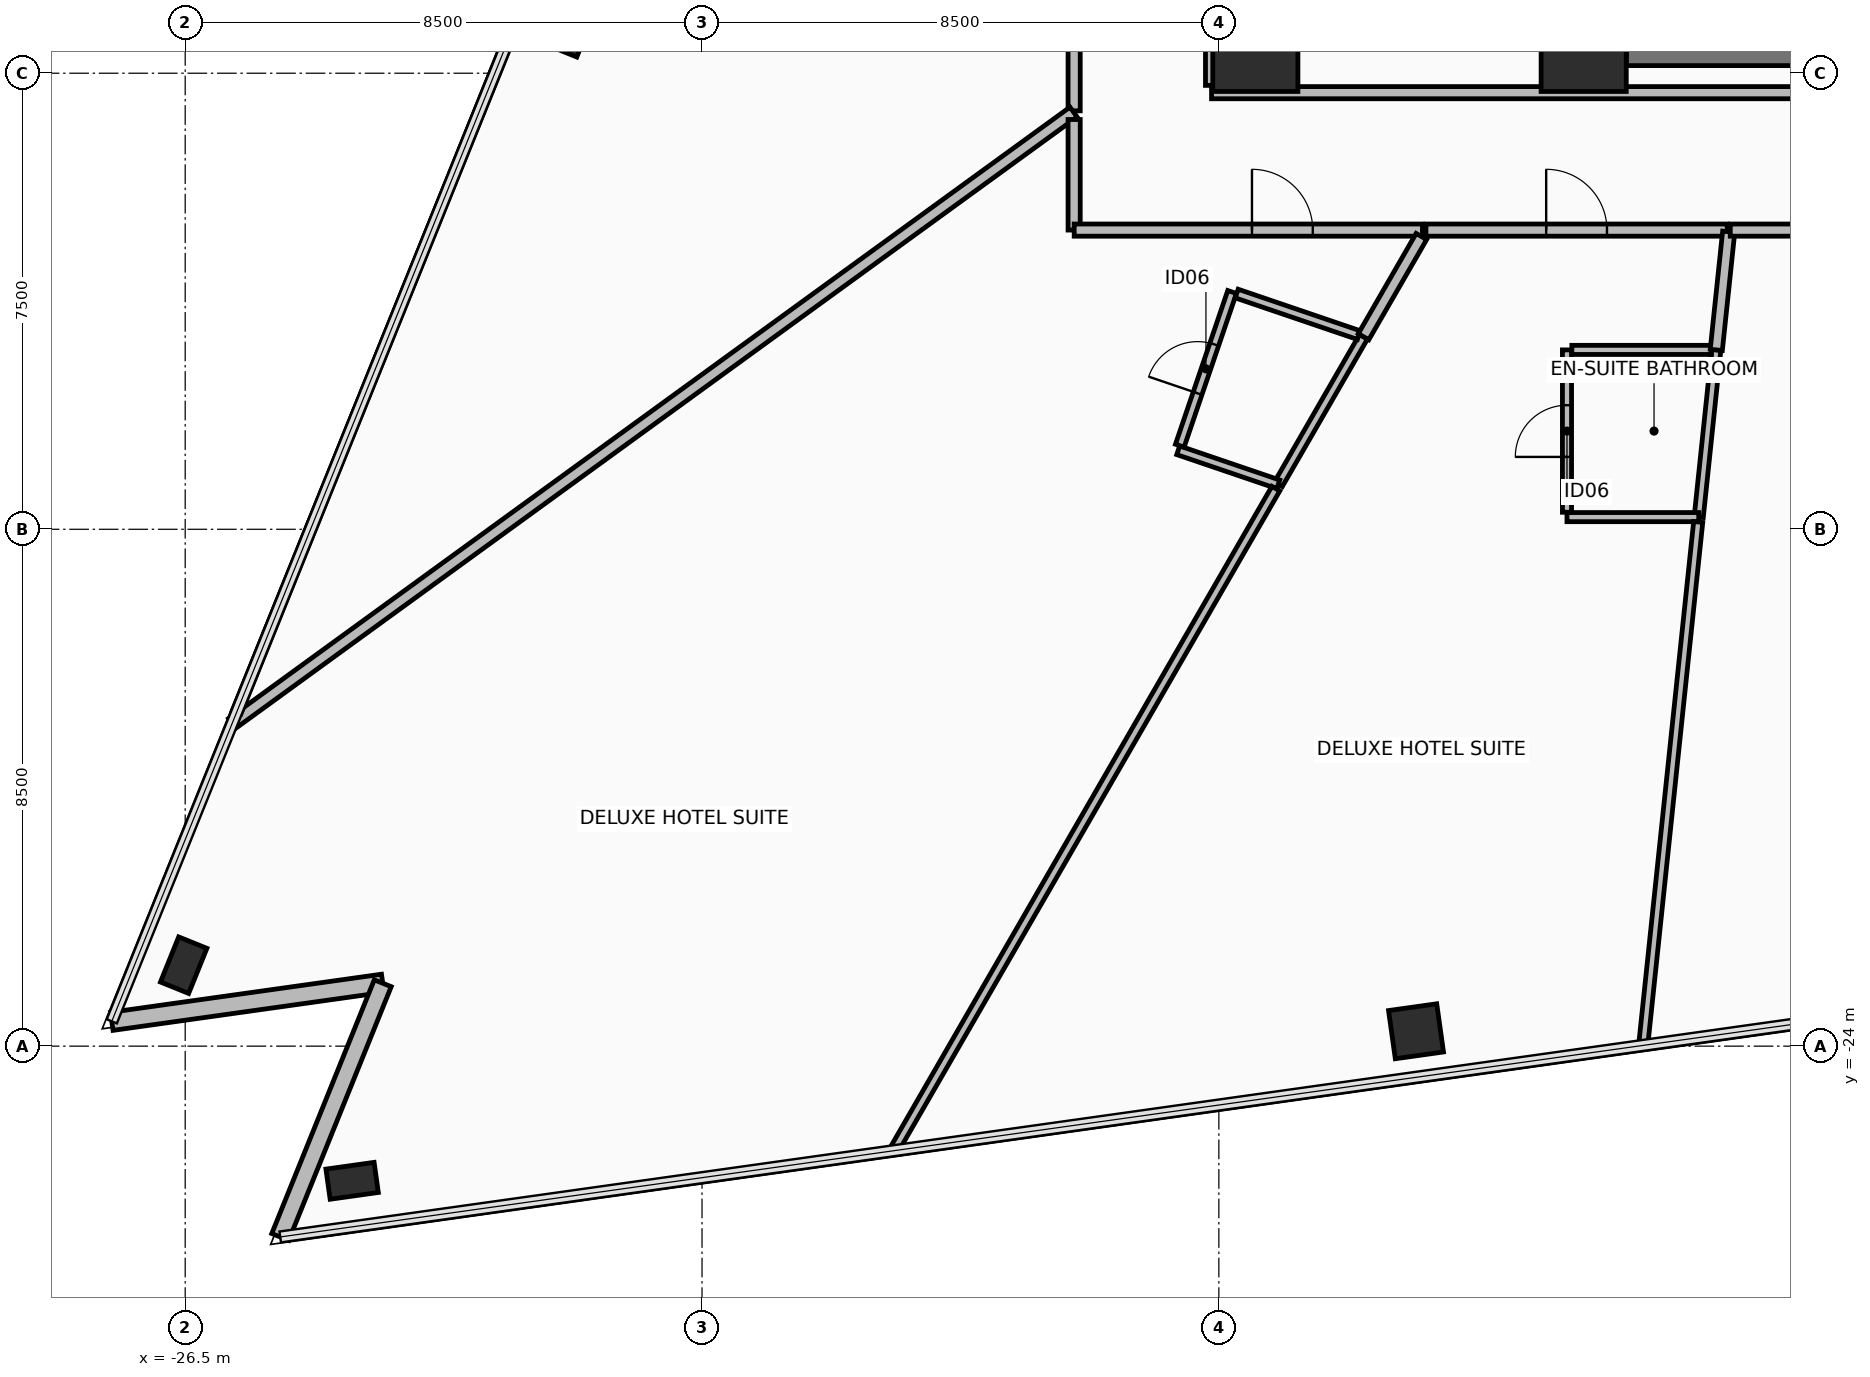
"""IFC4 building model, lengths in metres.
Left out: names, types, materials, properties, quantities, classifications, styles, units other than length and angle.
Written with IfcOpenShell. Run it as: python <this file> out.ifc"""

import sys

from ifc_helpers import new_model, si_unit, direction, frame, frame_2d, origin, origin_2d, place, context, subcontext, project, spatial, rectangle, hollow_rectangle, extrude, element, fill, save


model = new_model("IFC4")
c1 = context("Model", 3, precision=1e-05, world=origin(), true_north=direction((0.0, 1.0)))
c2 = subcontext(c1, "Body", "Model", "MODEL_VIEW")
j1 = project(units=[si_unit("LENGTHUNIT", "METRE"), si_unit("PLANEANGLEUNIT", "RADIAN")], contexts=[c1])
p1 = place(None, origin())
s1 = spatial("IfcSite", under=j1, at=p1, CompositionType="ELEMENT")
p2 = place(p1, origin())
s2 = spatial("IfcBuilding", under=s1, at=p2, CompositionType="ELEMENT")
p3 = place(p2, frame((0.0, 0.0, 63.85)))
s3 = spatial("IfcBuildingStorey", under=s2, at=p3, CompositionType="ELEMENT", Elevation=63.85)
for number, where, z_axis, x_axis in (
    (1, (-8.9, -7.6, 0.0), (0.0, 0.0, 1.0), (1.0, 0.0, 0.0)),
    (2, (-3.5, -7.6, 0.0), (0.0, 0.0, 1.0), (1.0, 0.0, 0.0)),
):
    element("IfcColumn", number, at=place(p3, frame(where, z_axis=z_axis, x_axis=x_axis)), inside=s3, PredefinedType="COLUMN", context=c2, shape_type="SweptSolid", body=[
        extrude(rectangle(XDim=1.4, YDim=1.4, at=origin_2d()), origin(), (0.0, 0.0, 1.0), 3.45),
    ])
p4 = place(p3, frame((-20.281, -7.213, 0.0), z_axis=(0.0, 0.0, 1.0), x_axis=(0.374608211656, 0.927183200754, 0.0)))
e3 = element("IfcColumn", 3, at=p4, inside=s3, PredefinedType="COLUMN", context=c2, shape_type="SweptSolid", body=[
    extrude(hollow_rectangle(XDim=0.8, YDim=0.8, WallThickness=0.045, at=origin_2d()), origin(), (0.0, 0.0, 1.0), 3.45),
])
for number, where, z_axis, x_axis in (
    (4, (-26.525, -22.668, 0.0), (0.0, 0.0, 1.0), (0.375, 0.927, 0.0)),
    (5, (-23.755, -26.214, 0.0), (0.0, 0.0, 1.0), (0.99, 0.139, 0.0)),
):
    element("IfcColumn", number, at=place(p3, frame(where, z_axis=z_axis, x_axis=x_axis)), inside=s3, PredefinedType="COLUMN", context=c2, shape_type="SweptSolid", body=[
        extrude(hollow_rectangle(XDim=0.5, YDim=0.8, WallThickness=0.04, at=origin_2d()), origin(), (0.0, 0.0, 1.0), 3.45),
    ])
p5 = place(p3, frame((-6.257, -23.755, 0.0), z_axis=(0.0, 0.0, 1.0), x_axis=(0.990268068742, 0.13917310096, 0.0)))
e6 = element("IfcColumn", 6, at=p5, inside=s3, PredefinedType="COLUMN", context=c2, shape_type="SweptSolid", body=[
    extrude(hollow_rectangle(XDim=0.8, YDim=0.8, WallThickness=0.045, at=origin_2d()), origin(), (0.0, 0.0, 1.0), 3.45),
])
p6 = place(p3, frame((-27.707, -23.592, 0.0), z_axis=(0.0, 0.0, 1.0), x_axis=(0.990269200152, 0.139165050317, 0.0)))
e7 = element("IfcWall", 7, at=p6, inside=s3, PredefinedType="STANDARD", context=c2, shape_type="SweptSolid", body=[
    extrude(rectangle(XDim=4.5, YDim=0.3, at=frame_2d((2.25, 0.0))), origin(), (0.0, 0.0, 1.0), 2.47),
])
p7 = place(p3, frame((-23.251, -22.966, 0.0), z_axis=(0.0, 0.0, 1.0), x_axis=(-0.374568898324, -0.927199083481, 0.0)))
e8 = element("IfcWall", 8, at=p7, inside=s3, PredefinedType="STANDARD", context=c2, shape_type="SweptSolid", body=[
    extrude(rectangle(XDim=4.5, YDim=0.3, at=frame_2d((2.25, 0.0))), origin(), (0.0, 0.0, 1.0), 2.47),
])
p8 = place(p3, frame((-2.8, -7.6, 0.0), z_axis=(0.0, 0.0, 1.0), x_axis=(1.0, 0.0, 0.0)))
e9 = element("IfcWall", 9, at=p8, inside=s3, PredefinedType="SHEAR", context=c2, shape_type="SweptSolid", body=[
    extrude(rectangle(XDim=5.38, YDim=0.55, at=frame_2d((2.69, 0.0))), origin(), (0.0, 0.0, 1.0), 3.275),
])
p9 = place(p3, frame((-9.62, -8.32, 0.0), z_axis=(0.0, 0.0, 1.0), x_axis=(1.0, 0.0, 0.0)))
e10 = element("IfcWall", 10, at=p9, inside=s3, PredefinedType="PARTITIONING", context=c2, shape_type="SweptSolid", body=[
    extrude(rectangle(XDim=19.24, YDim=0.2, at=frame_2d((9.62, 0.0))), origin(), (0.0, 0.0, 1.0), 2.67),
])
p10 = place(p9, frame((15.02, 0.0, 0.0)))
e11 = element("IfcOpeningElement", 11, at=p10, cuts=e10, PredefinedType="OPENING", context=c2, shape_type="SweptSolid", body=[
    extrude(rectangle(XDim=0.9, YDim=2.1, at=frame_2d((0.45, 1.05))), frame((0.0, 0.11, 0.0), z_axis=(0.0, -1.0, 0.0), x_axis=(1.0, 0.0, 0.0)), (0.0, 0.0, 1.0), 0.22),
])
p11 = place(p3, frame((-9.62, 8.2, 0.0), z_axis=(0.0, 0.0, 1.0), x_axis=(0.0, -1.0, 0.0)))
e12 = element("IfcWall", 12, at=p11, inside=s3, PredefinedType="PARTITIONING", context=c2, shape_type="SweptSolid", body=[
    extrude(rectangle(XDim=16.4, YDim=0.2, at=frame_2d((8.2, 0.0))), origin(), (0.0, 0.0, 1.0), 2.67),
])
p12 = place(p11, frame((12.65, 0.0, 0.0)))
e13 = element("IfcOpeningElement", 13, at=p12, cuts=e12, PredefinedType="OPENING", context=c2, shape_type="SweptSolid", body=[
    extrude(rectangle(XDim=1.1, YDim=2.15, at=frame_2d((0.55, 1.075))), frame((0.0, 0.11, 0.0), z_axis=(0.0, -1.0, 0.0), x_axis=(1.0, 0.0, 0.0)), (0.0, 0.0, 1.0), 0.22),
])
p13 = place(p3, frame((-3.5, -7.6, 0.0), z_axis=(0.0, 0.0, 1.0), x_axis=(1.0, 0.0, 0.0)))
e14 = element("IfcWall", 14, at=p13, inside=s3, PredefinedType="PARTITIONING", context=c2, shape_type="SweptSolid", body=[
    extrude(rectangle(XDim=0.7, YDim=0.2, at=frame_2d((0.35, 0.0))), origin(), (0.0, 0.0, 1.0), 2.47),
])
p14 = place(p3, frame((-7.121, -12.333, 0.0), z_axis=(0.0, 0.0, 1.0), x_axis=(-0.499988825533, -0.86603185527, 0.0)))
e15 = element("IfcWall", 15, at=p14, inside=s3, PredefinedType="PARTITIONING", context=c2, shape_type="SweptSolid", body=[
    extrude(rectangle(XDim=2.803, YDim=0.15, at=frame_2d((1.402, 0.0))), origin(), (0.0, 0.0, 1.0), 2.67),
])
p15 = place(p3, frame((-8.522, -14.761, 0.0), z_axis=(0.0, 0.0, 1.0), x_axis=(-0.946713679558, 0.322076402329, 0.0)))
e16 = element("IfcWall", 16, at=p15, inside=s3, PredefinedType="PARTITIONING", context=c2, shape_type="SweptSolid", body=[
    extrude(rectangle(XDim=1.739, YDim=0.15, at=frame_2d((0.87, 0.0))), origin(), (0.0, 0.0, 1.0), 3.275),
])
p16 = place(p3, frame((-10.143, -14.125, 0.0), z_axis=(0.0, 0.0, 1.0), x_axis=(0.322146980742, 0.946689665518, 0.0)))
e17 = element("IfcWall", 17, at=p16, inside=s3, PredefinedType="PARTITIONING", context=c2, shape_type="SweptSolid", body=[
    extrude(rectangle(XDim=2.67, YDim=0.15, at=frame_2d((1.335, 0.0))), origin(), (0.0, 0.0, 1.0), 3.275),
])
p17 = place(p16, frame((0.91, 0.0, 0.0)))
e18 = element("IfcOpeningElement", 18, at=p17, cuts=e17, PredefinedType="OPENING", context=c2, shape_type="SweptSolid", body=[
    extrude(rectangle(XDim=0.85, YDim=2.1, at=frame_2d((0.425, 1.05))), frame((0.0, 0.085, 0.0), z_axis=(0.0, -1.0, 0.0), x_axis=(1.0, 0.0, 0.0)), (0.0, 0.0, 1.0), 0.17),
])
p18 = place(p3, frame((-9.207, -11.623, 0.0), z_axis=(0.0, 0.0, 1.0), x_axis=(0.946697686769, -0.32212340782, 0.0)))
e19 = element("IfcWall", 19, at=p18, inside=s3, PredefinedType="PARTITIONING", context=c2, shape_type="SweptSolid", body=[
    extrude(rectangle(XDim=2.122, YDim=0.15, at=frame_2d((1.061, 0.0))), origin(), (0.0, 0.0, 1.0), 2.67),
])
p19 = place(p3, frame((-1.319, -12.55, 0.0), z_axis=(0.0, 0.0, 1.0), x_axis=(-0.104537710696, -0.994520923381, 0.0)))
e20 = element("IfcWall", 20, at=p19, inside=s3, PredefinedType="PARTITIONING", context=c2, shape_type="SweptSolid", body=[
    extrude(rectangle(XDim=2.765, YDim=0.15, at=frame_2d((1.383, 0.0))), origin(), (0.0, 0.0, 1.0), 3.275),
])
p20 = place(p3, frame((-1.608, -15.3, 0.0), z_axis=(0.0, 0.0, 1.0), x_axis=(-1.0, 0.0, 0.0)))
e21 = element("IfcWall", 21, at=p20, inside=s3, PredefinedType="PARTITIONING", context=c2, shape_type="SweptSolid", body=[
    extrude(rectangle(XDim=2.167, YDim=0.15, at=frame_2d((1.083, 0.0))), origin(), (0.0, 0.0, 1.0), 3.275),
])
p21 = place(p3, frame((-3.775, -15.22, 0.0), z_axis=(0.0, 0.0, 1.0), x_axis=(0.0, 1.0, 0.0)))
e22 = element("IfcWall", 22, at=p21, inside=s3, PredefinedType="PARTITIONING", context=c2, shape_type="SweptSolid", body=[
    extrude(rectangle(XDim=2.67, YDim=0.15, at=frame_2d((1.335, 0.0))), origin(), (0.0, 0.0, 1.0), 3.275),
])
p22 = place(p21, frame((0.91, 0.0, 0.0)))
e23 = element("IfcOpeningElement", 23, at=p22, cuts=e22, PredefinedType="OPENING", context=c2, shape_type="SweptSolid", body=[
    extrude(rectangle(XDim=0.85, YDim=2.1, at=frame_2d((0.425, 1.05))), frame((0.0, 0.085, 0.0), z_axis=(0.0, -1.0, 0.0), x_axis=(1.0, 0.0, 0.0)), (0.0, 0.0, 1.0), 0.17),
])
p23 = place(p3, frame((-3.695, -12.55, 0.0), z_axis=(0.0, 0.0, 1.0), x_axis=(1.0, 0.0, 0.0)))
e24 = element("IfcWall", 24, at=p23, inside=s3, PredefinedType="PARTITIONING", context=c2, shape_type="SweptSolid", body=[
    extrude(rectangle(XDim=2.295, YDim=0.15, at=frame_2d((1.147, 0.0))), origin(), (0.0, 0.0, 1.0), 3.275),
])
p24 = place(p3, frame((-11.88, -2.556, 0.0), z_axis=(0.0, 0.0, 1.0), x_axis=(0.0, -1.0, 0.0)))
e25 = element("IfcWall", 25, at=p24, inside=s3, PredefinedType="PARTITIONING", context=c2, shape_type="SweptSolid", body=[
    extrude(rectangle(XDim=6.063, YDim=0.2, at=frame_2d((3.031, 0.0))), origin(), (0.0, 0.0, 1.0), 2.67),
])
p25 = place(p24, frame((2.606, 0.0, 0.0)))
e26 = element("IfcOpeningElement", 26, at=p25, cuts=e25, PredefinedType="OPENING", context=c2, shape_type="SweptSolid", body=[
    extrude(rectangle(XDim=0.85, YDim=2.1, at=frame_2d((0.425, 1.05))), frame((0.0, 0.11, 0.0), z_axis=(0.0, -1.0, 0.0), x_axis=(1.0, 0.0, 0.0)), (0.0, 0.0, 1.0), 0.22),
])
p26 = place(p3, frame((-11.89, -8.639, 0.0), z_axis=(0.0, 0.0, 1.0), x_axis=(-0.809020553383, -0.587780353706, 0.0)))
e27 = element("IfcWall", 27, at=p26, inside=s3, PredefinedType="PARTITIONING", context=c2, shape_type="SweptSolid", body=[
    extrude(rectangle(XDim=17.103, YDim=0.2, at=frame_2d((8.552, 0.0))), origin(), (0.0, 0.0, 1.0), 2.47),
])
p27 = place(p3, frame((-25.653, -18.508, 0.0), z_axis=(0.0, 0.0, 1.0), x_axis=(0.37462120028, 0.927177952877, 0.0)))
e28 = element("IfcWall", 28, at=p27, inside=s3, PredefinedType="PARTITIONING", context=c2, shape_type="SweptSolid", body=[
    extrude(rectangle(XDim=15.391, YDim=0.15, at=frame_2d((7.695, 0.0))), origin(), (0.0, 0.0, 1.0), 3.275),
])
p28 = place(p3, frame((-11.88, -8.761, 0.0), z_axis=(0.0, 0.0, 1.0), x_axis=(0.0, -1.0, 0.0)))
e29 = element("IfcWall", 29, at=p28, inside=s3, PredefinedType="PARTITIONING", context=c2, shape_type="SweptSolid", body=[
    extrude(rectangle(XDim=1.818, YDim=0.2, at=frame_2d((0.909, 0.0))), origin(), (0.0, 0.0, 1.0), 2.67),
])
p29 = place(p3, frame((-11.879, -10.58, 0.0), z_axis=(0.0, 0.0, 1.0), x_axis=(1.0, 0.0, 0.0)))
e30 = element("IfcWall", 30, at=p29, inside=s3, PredefinedType="PARTITIONING", context=c2, shape_type="SweptSolid", body=[
    extrude(rectangle(XDim=5.728, YDim=0.2, at=frame_2d((2.864, 0.0))), origin(), (0.0, 0.0, 1.0), 2.67),
])
p30 = place(p29, frame((2.924, 0.0, 0.0)))
e31 = element("IfcOpeningElement", 31, at=p30, cuts=e30, PredefinedType="OPENING", context=c2, shape_type="SweptSolid", body=[
    extrude(rectangle(XDim=1.0, YDim=2.15, at=frame_2d((0.5, 1.075))), frame((0.0, 0.11, 0.0), z_axis=(0.0, -1.0, 0.0), x_axis=(1.0, 0.0, 0.0)), (0.0, 0.0, 1.0), 0.22),
])
p31 = place(p3, frame((-6.169, -10.685, 0.0), z_axis=(0.0, 0.0, 1.0), x_axis=(-0.500029664053, -0.866008276558, 0.0)))
e32 = element("IfcWall", 32, at=p31, inside=s3, PredefinedType="PARTITIONING", context=c2, shape_type="SweptSolid", body=[
    extrude(rectangle(XDim=1.903, YDim=0.2, at=frame_2d((0.952, 0.0))), origin(), (0.0, 0.0, 1.0), 3.275),
])
p32 = place(p3, frame((-8.563, -14.832, 0.0), z_axis=(0.0, 0.0, 1.0), x_axis=(-0.500008475426, -0.86602051044, 0.0)))
e33 = element("IfcWall", 33, at=p32, inside=s3, PredefinedType="PARTITIONING", context=c2, shape_type="SweptSolid", body=[
    extrude(rectangle(XDim=12.561, YDim=0.15, at=frame_2d((6.28, 0.0))), origin(), (0.0, 0.0, 1.0), 2.47),
])
p33 = place(p3, frame((-6.094, -10.58, 0.0), z_axis=(0.0, 0.0, 1.0), x_axis=(1.0, 0.0, 0.0)))
e34 = element("IfcWall", 34, at=p33, inside=s3, PredefinedType="PARTITIONING", context=c2, shape_type="SweptSolid", body=[
    extrude(rectangle(XDim=4.954, YDim=0.2, at=frame_2d((2.477, 0.0))), origin(), (0.0, 0.0, 1.0), 3.275),
])
p34 = place(p33, frame((1.977, 0.0, 0.0)))
e35 = element("IfcOpeningElement", 35, at=p34, cuts=e34, PredefinedType="OPENING", context=c2, shape_type="SweptSolid", body=[
    extrude(rectangle(XDim=1.0, YDim=2.15, at=frame_2d((0.5, 1.075))), frame((0.0, 0.11, 0.0), z_axis=(0.0, -1.0, 0.0), x_axis=(1.0, 0.0, 0.0)), (0.0, 0.0, 1.0), 0.22),
])
p35 = place(p3, frame((-1.115, -10.608, 0.0), z_axis=(0.0, 0.0, 1.0), x_axis=(-0.104502586471, -0.994524614789, 0.0)))
e36 = element("IfcWall", 36, at=p35, inside=s3, PredefinedType="PARTITIONING", context=c2, shape_type="SweptSolid", body=[
    extrude(rectangle(XDim=1.953, YDim=0.2, at=frame_2d((0.977, 0.0))), origin(), (0.0, 0.0, 1.0), 3.275),
])
p36 = place(p3, frame((-1.616, -15.38, 0.0), z_axis=(0.0, 0.0, 1.0), x_axis=(-0.104546448857, -0.994520004842, 0.0)))
e37 = element("IfcWall", 37, at=p36, inside=s3, PredefinedType="PARTITIONING", context=c2, shape_type="SweptSolid", body=[
    extrude(rectangle(XDim=8.636, YDim=0.15, at=frame_2d((4.318, 0.0))), origin(), (0.0, 0.0, 1.0), 2.47),
])
p37 = place(p3, frame((-1.09, -10.58, 0.0), z_axis=(0.0, 0.0, 1.0), x_axis=(1.0, 0.0, 0.0)))
e38 = element("IfcWall", 38, at=p37, inside=s3, PredefinedType="PARTITIONING", context=c2, shape_type="SweptSolid", body=[
    extrude(rectangle(XDim=4.509, YDim=0.2, at=frame_2d((2.254, 0.0))), origin(), (0.0, 0.0, 1.0), 3.275),
])
p38 = place(p37, frame((1.655, 0.0, 0.0)))
e39 = element("IfcOpeningElement", 39, at=p38, cuts=e38, PredefinedType="OPENING", context=c2, shape_type="SweptSolid", body=[
    extrude(rectangle(XDim=1.2, YDim=2.15, at=frame_2d((0.6, 1.075))), frame((0.0, 0.11, 0.0), z_axis=(0.0, -1.0, 0.0), x_axis=(1.0, 0.0, 0.0)), (0.0, 0.0, 1.0), 0.22),
])
p39 = place(p17, origin())
e40 = element("IfcDoor", 40, at=p39, inside=s3, OperationType="SINGLE_SWING_RIGHT", PredefinedType="DOOR", context=c2, shape_type="SweptSolid", body=[
    extrude(rectangle(XDim=0.85, YDim=2.1, at=frame_2d((0.425, 1.05))), frame((0.0, 0.025, 0.0), z_axis=(0.0, -1.0, 0.0), x_axis=(1.0, 0.0, 0.0)), (0.0, 0.0, 1.0), 0.05),
])
fill(e18, e40)
p40 = place(p22, origin())
e41 = element("IfcDoor", 41, at=p40, inside=s3, OperationType="SINGLE_SWING_RIGHT", PredefinedType="DOOR", context=c2, shape_type="SweptSolid", body=[
    extrude(rectangle(XDim=0.85, YDim=2.1, at=frame_2d((0.425, 1.05))), frame((0.0, 0.025, 0.0), z_axis=(0.0, -1.0, 0.0), x_axis=(1.0, 0.0, 0.0)), (0.0, 0.0, 1.0), 0.05),
])
fill(e23, e41)
p41 = place(p30, origin())
e42 = element("IfcDoor", 42, at=p41, inside=s3, OperationType="SINGLE_SWING_LEFT", PredefinedType="DOOR", context=c2, shape_type="SweptSolid", body=[
    extrude(rectangle(XDim=1.0, YDim=2.15, at=frame_2d((0.5, 1.075))), frame((0.0, 0.025, 0.0), z_axis=(0.0, -1.0, 0.0), x_axis=(1.0, 0.0, 0.0)), (0.0, 0.0, 1.0), 0.05),
])
fill(e31, e42)
p42 = place(p34, origin())
e43 = element("IfcDoor", 43, at=p42, inside=s3, OperationType="SINGLE_SWING_LEFT", PredefinedType="DOOR", context=c2, shape_type="SweptSolid", body=[
    extrude(rectangle(XDim=1.0, YDim=2.15, at=frame_2d((0.5, 1.075))), frame((0.0, 0.025, 0.0), z_axis=(0.0, -1.0, 0.0), x_axis=(1.0, 0.0, 0.0)), (0.0, 0.0, 1.0), 0.05),
])
fill(e35, e43)
save(model, sys.argv[1])
